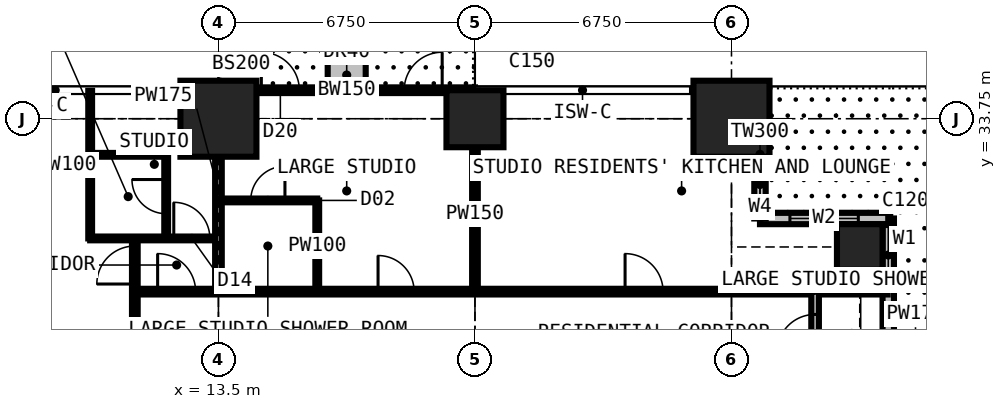
"""IFC4 building model, lengths in metres.
Left out: names, types, materials, properties, quantities, classifications, styles, units other than length and angle.
Written with IfcOpenShell. Run it as: python <this file> out.ifc"""

import sys

from ifc_helpers import new_model, si_unit, direction, frame, frame_2d, origin, origin_2d, place, context, subcontext, project, spatial, rectangle, extrude, element, fill, save


model = new_model("IFC4")
c1 = context("Model", 3, precision=1e-05, world=origin(), true_north=direction((0.0, 1.0)))
c2 = subcontext(c1, "Body", "Model", "MODEL_VIEW")
j1 = project(units=[si_unit("LENGTHUNIT", "METRE"), si_unit("PLANEANGLEUNIT", "RADIAN")], contexts=[c1])
p1 = place(None, origin())
s1 = spatial("IfcSite", under=j1, at=p1, CompositionType="ELEMENT")
p2 = place(p1, origin())
s2 = spatial("IfcBuilding", under=s1, at=p2, CompositionType="ELEMENT")
p3 = place(p2, frame((0.0, 0.0, 142.2)))
s3 = spatial("IfcBuildingStorey", under=s2, at=p3, CompositionType="ELEMENT", Elevation=142.2)
p4 = place(p3, frame((13.5, 33.75, 0.0), z_axis=(0.0, 0.0, 1.0), x_axis=(1.0, 0.0, 0.0)))
e1 = element("IfcColumn", 1, at=p4, inside=s3, PredefinedType="COLUMN", context=c2, shape_type="SweptSolid", body=[
    extrude(rectangle(XDim=2.0, YDim=2.0, at=origin_2d()), origin(), (0.0, 0.0, 1.0), 3.6),
])
p5 = place(p3, frame((20.25, 33.75, 0.0), z_axis=(0.0, 0.0, 1.0), x_axis=(1.0, 0.0, 0.0)))
e2 = element("IfcColumn", 2, at=p5, inside=s3, PredefinedType="COLUMN", context=c2, shape_type="SweptSolid", body=[
    extrude(rectangle(XDim=1.5, YDim=1.5, at=origin_2d()), origin(), (0.0, 0.0, 1.0), 3.6),
])
p6 = place(p3, frame((27.0, 33.75, 0.0), z_axis=(0.0, 0.0, 1.0), x_axis=(1.0, 0.0, 0.0)))
e3 = element("IfcColumn", 3, at=p6, inside=s3, PredefinedType="COLUMN", context=c2, shape_type="SweptSolid", body=[
    extrude(rectangle(XDim=2.0, YDim=2.0, at=origin_2d()), origin(), (0.0, 0.0, 1.0), 3.6),
])
p7 = place(p3, frame((30.375, 30.375, 0.0), z_axis=(0.0, 0.0, 1.0), x_axis=(1.0, 0.0, 0.0)))
e4 = element("IfcColumn", 4, at=p7, inside=s3, PredefinedType="COLUMN", context=c2, shape_type="SweptSolid", body=[
    extrude(rectangle(XDim=1.2, YDim=1.2, at=origin_2d()), origin(), (0.0, 0.0, 1.0), 3.6),
])
p8 = place(p3, frame((31.125, 27.75, 0.0), z_axis=(0.0, 0.0, 1.0), x_axis=(0.0, 1.0, 0.0)))
e5 = element("IfcWall", 5, at=p8, inside=s3, PredefinedType="SOLIDWALL", context=c2, shape_type="SweptSolid", body=[
    extrude(rectangle(XDim=3.375, YDim=0.3, at=frame_2d((1.688, 0.0))), origin(), (0.0, 0.0, 1.0), 3.375),
])
p9 = place(p8, frame((1.663, 0.0, 0.9)))
e6 = element("IfcOpeningElement", 6, at=p9, cuts=e5, PredefinedType="OPENING", context=c2, shape_type="SweptSolid", body=[
    extrude(rectangle(XDim=1.5, YDim=1.8, at=frame_2d((0.75, 0.9))), frame((0.0, 0.16, 0.0), z_axis=(0.0, -1.0, 0.0), x_axis=(1.0, 0.0, 0.0)), (0.0, 0.0, 1.0), 0.32),
])
p10 = place(p3, frame((31.125, 31.125, 0.0), z_axis=(0.0, 0.0, 1.0), x_axis=(-1.0, 0.0, 0.0)))
e7 = element("IfcWall", 7, at=p10, inside=s3, PredefinedType="SOLIDWALL", context=c2, shape_type="SweptSolid", body=[
    extrude(rectangle(XDim=3.375, YDim=0.3, at=frame_2d((1.688, 0.0))), origin(), (0.0, 0.0, 1.0), 3.375),
])
p11 = place(p10, frame((0.788, 0.0, 0.6)))
e8 = element("IfcOpeningElement", 8, at=p11, cuts=e7, PredefinedType="OPENING", context=c2, shape_type="SweptSolid", body=[
    extrude(rectangle(XDim=1.8, YDim=2.1, at=frame_2d((0.9, 1.05))), frame((0.0, 0.16, 0.0), z_axis=(0.0, -1.0, 0.0), x_axis=(1.0, 0.0, 0.0)), (0.0, 0.0, 1.0), 0.32),
])
p12 = place(p3, frame((27.75, 31.125, 0.0), z_axis=(0.0, 0.0, 1.0), x_axis=(0.0, 1.0, 0.0)))
e9 = element("IfcWall", 9, at=p12, inside=s3, PredefinedType="SOLIDWALL", context=c2, shape_type="SweptSolid", body=[
    extrude(rectangle(XDim=3.375, YDim=0.3, at=frame_2d((1.688, 0.0))), origin(), (0.0, 0.0, 1.0), 3.375),
])
p13 = place(p12, frame((0.292, 0.0, 0.9)))
e10 = element("IfcOpeningElement", 10, at=p13, cuts=e9, PredefinedType="OPENING", context=c2, shape_type="SweptSolid", body=[
    extrude(rectangle(XDim=1.2, YDim=1.8, at=frame_2d((0.6, 0.9))), frame((0.0, 0.16, 0.0), z_axis=(0.0, -1.0, 0.0), x_axis=(1.0, 0.0, 0.0)), (0.0, 0.0, 1.0), 0.32),
])
p14 = place(p3, frame((13.5, 34.5, 0.0), z_axis=(0.0, 0.0, 1.0), x_axis=(1.0, 0.0, 0.0)))
e11 = element("IfcWall", 11, at=p14, inside=s3, PredefinedType="SOLIDWALL", context=c2, shape_type="SweptSolid", body=[
    extrude(rectangle(XDim=6.75, YDim=0.15, at=frame_2d((3.375, 0.0))), origin(), (0.0, 0.0, 1.0), 3.375),
])
p15 = place(p14, frame((1.129, 0.0, 0.0)))
e12 = element("IfcOpeningElement", 12, at=p15, cuts=e11, PredefinedType="OPENING", context=c2, shape_type="SweptSolid", body=[
    extrude(rectangle(XDim=1.0, YDim=2.2, at=frame_2d((0.5, 1.1))), frame((0.0, 0.085, 0.0), z_axis=(0.0, -1.0, 0.0), x_axis=(1.0, 0.0, 0.0)), (0.0, 0.0, 1.0), 0.17),
])
p16 = place(p14, frame((2.258, 0.0, 0.9)))
e13 = element("IfcOpeningElement", 13, at=p16, cuts=e11, PredefinedType="OPENING", context=c2, shape_type="SweptSolid", body=[
    extrude(rectangle(XDim=0.9, YDim=1.8, at=frame_2d((0.45, 0.9))), frame((0.0, 0.085, 0.0), z_axis=(0.0, -1.0, 0.0), x_axis=(1.0, 0.0, 0.0)), (0.0, 0.0, 1.0), 0.17),
])
p17 = place(p14, frame((4.887, 0.0, 0.0)))
e14 = element("IfcOpeningElement", 14, at=p17, cuts=e11, PredefinedType="OPENING", context=c2, shape_type="SweptSolid", body=[
    extrude(rectangle(XDim=1.0, YDim=2.2, at=frame_2d((0.5, 1.1))), frame((0.0, 0.085, 0.0), z_axis=(0.0, -1.0, 0.0), x_axis=(1.0, 0.0, 0.0)), (0.0, 0.0, 1.0), 0.17),
])
p18 = place(p14, frame((3.575, 0.0, 0.9)))
e15 = element("IfcOpeningElement", 15, at=p18, cuts=e11, PredefinedType="OPENING", context=c2, shape_type="SweptSolid", body=[
    extrude(rectangle(XDim=1.2, YDim=1.8, at=frame_2d((0.6, 0.9))), frame((0.0, 0.085, 0.0), z_axis=(0.0, -1.0, 0.0), x_axis=(1.0, 0.0, 0.0)), (0.0, 0.0, 1.0), 0.17),
])
p19 = place(p3, frame((16.875, 34.6, 0.0), z_axis=(0.0, 0.0, 1.0), x_axis=(0.0, 1.0, 0.0)))
e16 = element("IfcWall", 16, at=p19, inside=s3, PredefinedType="USERDEFINED", context=c2, shape_type="SweptSolid", body=[
    extrude(rectangle(XDim=2.2, YDim=1.0, at=frame_2d((1.1, 0.0))), origin(), (0.0, 0.0, 1.0), 0.9),
])
p20 = place(p3, frame((10.125, 30.6, 0.0), z_axis=(0.0, 0.0, 1.0), x_axis=(0.0, 1.0, 0.0)))
e17 = element("IfcWall", 17, at=p20, inside=s3, PredefinedType="PARTITIONING", context=c2, shape_type="SweptSolid", body=[
    extrude(rectangle(XDim=3.884, YDim=0.1, at=frame_2d((1.942, 0.0))), origin(), (0.0, 0.0, 1.0), 3.375),
])
p21 = place(p3, frame((10.125, 30.6, 0.0), z_axis=(0.0, 0.0, 1.0), x_axis=(1.0, 0.0, 0.0)))
e18 = element("IfcWall", 18, at=p21, inside=s3, PredefinedType="PARTITIONING", context=c2, shape_type="SweptSolid", body=[
    extrude(rectangle(XDim=3.375, YDim=0.1, at=frame_2d((1.688, 0.0))), origin(), (0.0, 0.0, 1.0), 3.375),
])
p22 = place(p21, frame((2.2, 0.0, 0.0)))
e19 = element("IfcOpeningElement", 19, at=p22, cuts=e18, PredefinedType="OPENING", context=c2, shape_type="SweptSolid", body=[
    extrude(rectangle(XDim=0.95, YDim=2.2, at=frame_2d((0.475, 1.1))), frame((0.0, 0.06, 0.0), z_axis=(0.0, -1.0, 0.0), x_axis=(1.0, 0.0, 0.0)), (0.0, 0.0, 1.0), 0.12),
])
p23 = place(p3, frame((10.125, 32.8, 0.0), z_axis=(0.0, 0.0, 1.0), x_axis=(1.0, 0.0, 0.0)))
e20 = element("IfcWall", 20, at=p23, inside=s3, PredefinedType="PARTITIONING", context=c2, shape_type="SweptSolid", body=[
    extrude(rectangle(XDim=2.0, YDim=0.1, at=frame_2d((1.0, 0.0))), origin(), (0.0, 0.0, 1.0), 3.375),
])
p24 = place(p3, frame((11.3, 11.3, 0.0), z_axis=(0.0, 0.0, 1.0), x_axis=(0.0, 1.0, 0.0)))
e21 = element("IfcWall", 21, at=p24, inside=s3, PredefinedType="PARTITIONING", context=c2, shape_type="SweptSolid", body=[
    extrude(rectangle(XDim=19.3, YDim=0.15, at=frame_2d((9.65, 0.0))), origin(), (0.0, 0.0, 1.0), 3.375),
])
p25 = place(p24, frame((18.1, 0.0, 0.0)))
e22 = element("IfcOpeningElement", 22, at=p25, cuts=e21, PredefinedType="OPENING", context=c2, shape_type="SweptSolid", body=[
    extrude(rectangle(XDim=1.0, YDim=2.2, at=frame_2d((0.5, 1.1))), frame((0.0, 0.085, 0.0), z_axis=(0.0, -1.0, 0.0), x_axis=(1.0, 0.0, 0.0)), (0.0, 0.0, 1.0), 0.17),
])
p26 = place(p24, frame((12.137, 0.0, 0.0)))
e23 = element("IfcOpeningElement", 23, at=p26, cuts=e21, PredefinedType="OPENING", context=c2, shape_type="SweptSolid", body=[
    extrude(rectangle(XDim=1.0, YDim=2.2, at=frame_2d((0.5, 1.1))), frame((0.0, 0.085, 0.0), z_axis=(0.0, -1.0, 0.0), x_axis=(1.0, 0.0, 0.0)), (0.0, 0.0, 1.0), 0.17),
])
p27 = place(p3, frame((11.3, 29.2, 0.0), z_axis=(0.0, 0.0, 1.0), x_axis=(1.0, 0.0, 0.0)))
e24 = element("IfcWall", 24, at=p27, inside=s3, PredefinedType="PARTITIONING", context=c2, shape_type="SweptSolid", body=[
    extrude(rectangle(XDim=19.809, YDim=0.15, at=frame_2d((9.904, 0.0))), origin(), (0.0, 0.0, 1.0), 3.375),
])
p28 = place(p27, frame((12.9, 0.0, 0.0)))
e25 = element("IfcOpeningElement", 25, at=p28, cuts=e24, PredefinedType="OPENING", context=c2, shape_type="SweptSolid", body=[
    extrude(rectangle(XDim=1.0, YDim=2.2, at=frame_2d((0.5, 1.1))), frame((0.0, 0.085, 0.0), z_axis=(0.0, -1.0, 0.0), x_axis=(1.0, 0.0, 0.0)), (0.0, 0.0, 1.0), 0.17),
])
p29 = place(p27, frame((6.4, 0.0, 0.0)))
e26 = element("IfcOpeningElement", 26, at=p29, cuts=e24, PredefinedType="OPENING", context=c2, shape_type="SweptSolid", body=[
    extrude(rectangle(XDim=0.95, YDim=2.2, at=frame_2d((0.475, 1.1))), frame((0.0, 0.085, 0.0), z_axis=(0.0, -1.0, 0.0), x_axis=(1.0, 0.0, 0.0)), (0.0, 0.0, 1.0), 0.17),
])
p30 = place(p27, frame((0.6, 0.0, 0.0)))
e27 = element("IfcOpeningElement", 27, at=p30, cuts=e24, PredefinedType="OPENING", context=c2, shape_type="SweptSolid", body=[
    extrude(rectangle(XDim=1.0, YDim=2.2, at=frame_2d((0.5, 1.1))), frame((0.0, 0.085, 0.0), z_axis=(0.0, -1.0, 0.0), x_axis=(1.0, 0.0, 0.0)), (0.0, 0.0, 1.0), 0.17),
])
p31 = place(p3, frame((12.125, 30.6, 0.0), z_axis=(0.0, 0.0, 1.0), x_axis=(0.0, 1.0, 0.0)))
e28 = element("IfcWall", 28, at=p31, inside=s3, PredefinedType="PARTITIONING", context=c2, shape_type="SweptSolid", body=[
    extrude(rectangle(XDim=2.2, YDim=0.1, at=frame_2d((1.1, 0.0))), origin(), (0.0, 0.0, 1.0), 3.375),
])
p32 = place(p31, frame((0.65, 0.0, 0.0)))
e29 = element("IfcOpeningElement", 29, at=p32, cuts=e28, PredefinedType="OPENING", context=c2, shape_type="SweptSolid", body=[
    extrude(rectangle(XDim=0.9, YDim=2.2, at=frame_2d((0.45, 1.1))), frame((0.0, 0.06, 0.0), z_axis=(0.0, -1.0, 0.0), x_axis=(1.0, 0.0, 0.0)), (0.0, 0.0, 1.0), 0.12),
])
p33 = place(p3, frame((13.5, 29.2, 0.0), z_axis=(0.0, 0.0, 1.0), x_axis=(0.0, 1.0, 0.0)))
e30 = element("IfcWall", 30, at=p33, inside=s3, PredefinedType="PARTITIONING", context=c2, shape_type="SweptSolid", body=[
    extrude(rectangle(XDim=5.284, YDim=0.175, at=frame_2d((2.642, 0.0))), origin(), (0.0, 0.0, 1.0), 2.806),
])
p34 = place(p3, frame((13.5, 31.6, 0.0), z_axis=(0.0, 0.0, 1.0), x_axis=(1.0, 0.0, 0.0)))
e31 = element("IfcWall", 31, at=p34, inside=s3, PredefinedType="PARTITIONING", context=c2, shape_type="SweptSolid", body=[
    extrude(rectangle(XDim=2.6, YDim=0.1, at=frame_2d((1.3, 0.0))), origin(), (0.0, 0.0, 1.0), 3.375),
])
p35 = place(p34, frame((0.85, 0.0, 0.0)))
e32 = element("IfcOpeningElement", 32, at=p35, cuts=e31, PredefinedType="OPENING", context=c2, shape_type="SweptSolid", body=[
    extrude(rectangle(XDim=0.9, YDim=2.2, at=frame_2d((0.45, 1.1))), frame((0.0, 0.06, 0.0), z_axis=(0.0, -1.0, 0.0), x_axis=(1.0, 0.0, 0.0)), (0.0, 0.0, 1.0), 0.12),
])
p36 = place(p3, frame((16.1, 29.2, 0.0), z_axis=(0.0, 0.0, 1.0), x_axis=(0.0, 1.0, 0.0)))
e33 = element("IfcWall", 33, at=p36, inside=s3, PredefinedType="PARTITIONING", context=c2, shape_type="SweptSolid", body=[
    extrude(rectangle(XDim=2.4, YDim=0.1, at=frame_2d((1.2, 0.0))), origin(), (0.0, 0.0, 1.0), 3.375),
])
p37 = place(p3, frame((20.25, 29.2, 0.0), z_axis=(0.0, 0.0, 1.0), x_axis=(0.0, 1.0, 0.0)))
e34 = element("IfcWall", 34, at=p37, inside=s3, PredefinedType="PARTITIONING", context=c2, shape_type="SweptSolid", body=[
    extrude(rectangle(XDim=5.284, YDim=0.15, at=frame_2d((2.642, 0.0))), origin(), (0.0, 0.0, 1.0), 2.806),
])
p38 = place(p3, frame((29.2, 11.3, 0.0), z_axis=(0.0, 0.0, 1.0), x_axis=(0.0, 1.0, 0.0)))
e35 = element("IfcWall", 35, at=p38, inside=s3, PredefinedType="PARTITIONING", context=c2, shape_type="SweptSolid", body=[
    extrude(rectangle(XDim=17.9, YDim=0.2, at=frame_2d((8.95, 0.0))), origin(), (0.0, 0.0, 1.0), 3.375),
])
p39 = place(p38, frame((10.55, 0.0, 0.0)))
e36 = element("IfcOpeningElement", 36, at=p39, cuts=e35, PredefinedType="OPENING", context=c2, shape_type="SweptSolid", body=[
    extrude(rectangle(XDim=0.95, YDim=2.2, at=frame_2d((0.475, 1.1))), frame((0.0, 0.11, 0.0), z_axis=(0.0, -1.0, 0.0), x_axis=(1.0, 0.0, 0.0)), (0.0, 0.0, 1.0), 0.22),
])
p40 = place(p38, frame((16.3, 0.0, 0.0)))
e37 = element("IfcOpeningElement", 37, at=p40, cuts=e35, PredefinedType="OPENING", context=c2, shape_type="SweptSolid", body=[
    extrude(rectangle(XDim=1.0, YDim=2.2, at=frame_2d((0.5, 1.1))), frame((0.0, 0.11, 0.0), z_axis=(0.0, -1.0, 0.0), x_axis=(1.0, 0.0, 0.0)), (0.0, 0.0, 1.0), 0.22),
])
p41 = place(p38, frame((5.1, 0.0, 0.0)))
e38 = element("IfcOpeningElement", 38, at=p41, cuts=e35, PredefinedType="OPENING", context=c2, shape_type="SweptSolid", body=[
    extrude(rectangle(XDim=0.95, YDim=2.2, at=frame_2d((0.475, 1.1))), frame((0.0, 0.11, 0.0), z_axis=(0.0, -1.0, 0.0), x_axis=(1.0, 0.0, 0.0)), (0.0, 0.0, 1.0), 0.22),
])
p42 = place(p9, origin())
e39 = element("IfcWindow", 39, at=p42, inside=s3, PartitioningType="SINGLE_PANEL", PredefinedType="WINDOW", context=c2, shape_type="SweptSolid", body=[
    extrude(rectangle(XDim=1.5, YDim=1.8, at=frame_2d((0.75, 0.9))), frame((0.0, 0.03, 0.0), z_axis=(0.0, -1.0, 0.0), x_axis=(1.0, 0.0, 0.0)), (0.0, 0.0, 1.0), 0.06),
])
fill(e6, e39)
p43 = place(p11, origin())
e40 = element("IfcWindow", 40, at=p43, inside=s3, PartitioningType="SINGLE_PANEL", PredefinedType="WINDOW", context=c2, shape_type="SweptSolid", body=[
    extrude(rectangle(XDim=1.8, YDim=2.1, at=frame_2d((0.9, 1.05))), frame((0.0, 0.03, 0.0), z_axis=(0.0, -1.0, 0.0), x_axis=(1.0, 0.0, 0.0)), (0.0, 0.0, 1.0), 0.06),
])
fill(e8, e40)
p44 = place(p13, origin())
e41 = element("IfcWindow", 41, at=p44, inside=s3, PartitioningType="SINGLE_PANEL", PredefinedType="WINDOW", context=c2, shape_type="SweptSolid", body=[
    extrude(rectangle(XDim=1.2, YDim=1.8, at=frame_2d((0.6, 0.9))), frame((0.0, 0.03, 0.0), z_axis=(0.0, -1.0, 0.0), x_axis=(1.0, 0.0, 0.0)), (0.0, 0.0, 1.0), 0.06),
])
fill(e10, e41)
p45 = place(p15, origin())
e42 = element("IfcDoor", 42, at=p45, inside=s3, OperationType="SINGLE_SWING_LEFT", PredefinedType="DOOR", context=c2, shape_type="SweptSolid", body=[
    extrude(rectangle(XDim=1.0, YDim=2.2, at=frame_2d((0.5, 1.1))), frame((0.0, 0.025, 0.0), z_axis=(0.0, -1.0, 0.0), x_axis=(1.0, 0.0, 0.0)), (0.0, 0.0, 1.0), 0.05),
])
fill(e12, e42)
p46 = place(p16, origin())
e43 = element("IfcWindow", 43, at=p46, inside=s3, PartitioningType="SINGLE_PANEL", PredefinedType="WINDOW", context=c2, shape_type="SweptSolid", body=[
    extrude(rectangle(XDim=0.9, YDim=1.8, at=frame_2d((0.45, 0.9))), frame((0.0, 0.03, 0.0), z_axis=(0.0, -1.0, 0.0), x_axis=(1.0, 0.0, 0.0)), (0.0, 0.0, 1.0), 0.06),
])
fill(e13, e43)
p47 = place(p17, origin())
e44 = element("IfcDoor", 44, at=p47, inside=s3, OperationType="SINGLE_SWING_RIGHT", PredefinedType="DOOR", context=c2, shape_type="SweptSolid", body=[
    extrude(rectangle(XDim=1.0, YDim=2.2, at=frame_2d((0.5, 1.1))), frame((0.0, 0.025, 0.0), z_axis=(0.0, -1.0, 0.0), x_axis=(1.0, 0.0, 0.0)), (0.0, 0.0, 1.0), 0.05),
])
fill(e14, e44)
p48 = place(p18, origin())
e45 = element("IfcWindow", 45, at=p48, inside=s3, PartitioningType="SINGLE_PANEL", PredefinedType="WINDOW", context=c2, shape_type="SweptSolid", body=[
    extrude(rectangle(XDim=1.2, YDim=1.8, at=frame_2d((0.6, 0.9))), frame((0.0, 0.03, 0.0), z_axis=(0.0, -1.0, 0.0), x_axis=(1.0, 0.0, 0.0)), (0.0, 0.0, 1.0), 0.06),
])
fill(e15, e45)
p49 = place(p40, origin())
e46 = element("IfcDoor", 46, at=p49, inside=s3, OperationType="SINGLE_SWING_LEFT", PredefinedType="DOOR", context=c2, shape_type="SweptSolid", body=[
    extrude(rectangle(XDim=1.0, YDim=2.2, at=frame_2d((0.5, 1.1))), frame((0.0, 0.025, 0.0), z_axis=(0.0, -1.0, 0.0), x_axis=(1.0, 0.0, 0.0)), (0.0, 0.0, 1.0), 0.05),
])
fill(e37, e46)
p50 = place(p28, origin())
e47 = element("IfcDoor", 47, at=p50, inside=s3, OperationType="SINGLE_SWING_LEFT", PredefinedType="DOOR", context=c2, shape_type="SweptSolid", body=[
    extrude(rectangle(XDim=1.0, YDim=2.2, at=frame_2d((0.5, 1.1))), frame((0.0, 0.025, 0.0), z_axis=(0.0, -1.0, 0.0), x_axis=(1.0, 0.0, 0.0)), (0.0, 0.0, 1.0), 0.05),
])
fill(e25, e47)
p51 = place(p29, origin())
e48 = element("IfcDoor", 48, at=p51, inside=s3, OperationType="SINGLE_SWING_LEFT", PredefinedType="DOOR", context=c2, shape_type="SweptSolid", body=[
    extrude(rectangle(XDim=0.95, YDim=2.2, at=frame_2d((0.475, 1.1))), frame((0.0, 0.025, 0.0), z_axis=(0.0, -1.0, 0.0), x_axis=(1.0, 0.0, 0.0)), (0.0, 0.0, 1.0), 0.05),
])
fill(e26, e48)
p52 = place(p35, origin())
e49 = element("IfcDoor", 49, at=p52, inside=s3, OperationType="SINGLE_SWING_RIGHT", PredefinedType="DOOR", context=c2, shape_type="SweptSolid", body=[
    extrude(rectangle(XDim=0.9, YDim=2.2, at=frame_2d((0.45, 1.1))), frame((0.0, 0.025, 0.0), z_axis=(0.0, -1.0, 0.0), x_axis=(1.0, 0.0, 0.0)), (0.0, 0.0, 1.0), 0.05),
])
fill(e32, e49)
p53 = place(p22, origin())
e50 = element("IfcDoor", 50, at=p53, inside=s3, OperationType="SINGLE_SWING_LEFT", PredefinedType="DOOR", context=c2, shape_type="SweptSolid", body=[
    extrude(rectangle(XDim=0.95, YDim=2.2, at=frame_2d((0.475, 1.1))), frame((0.0, 0.025, 0.0), z_axis=(0.0, -1.0, 0.0), x_axis=(1.0, 0.0, 0.0)), (0.0, 0.0, 1.0), 0.05),
])
fill(e19, e50)
p54 = place(p32, origin())
e51 = element("IfcDoor", 51, at=p54, inside=s3, OperationType="SINGLE_SWING_RIGHT", PredefinedType="DOOR", context=c2, shape_type="SweptSolid", body=[
    extrude(rectangle(XDim=0.9, YDim=2.2, at=frame_2d((0.45, 1.1))), frame((0.0, 0.025, 0.0), z_axis=(0.0, -1.0, 0.0), x_axis=(1.0, 0.0, 0.0)), (0.0, 0.0, 1.0), 0.05),
])
fill(e29, e51)
p55 = place(p30, origin())
e52 = element("IfcDoor", 52, at=p55, inside=s3, OperationType="SINGLE_SWING_LEFT", PredefinedType="DOOR", context=c2, shape_type="SweptSolid", body=[
    extrude(rectangle(XDim=1.0, YDim=2.2, at=frame_2d((0.5, 1.1))), frame((0.0, 0.025, 0.0), z_axis=(0.0, -1.0, 0.0), x_axis=(1.0, 0.0, 0.0)), (0.0, 0.0, 1.0), 0.05),
])
fill(e27, e52)
p56 = place(p25, origin())
e53 = element("IfcDoor", 53, at=p56, inside=s3, OperationType="SINGLE_SWING_LEFT", PredefinedType="DOOR", context=c2, shape_type="SweptSolid", body=[
    extrude(rectangle(XDim=1.0, YDim=2.2, at=frame_2d((0.5, 1.1))), frame((0.0, 0.025, 0.0), z_axis=(0.0, -1.0, 0.0), x_axis=(1.0, 0.0, 0.0)), (0.0, 0.0, 1.0), 0.05),
])
fill(e22, e53)
save(model, sys.argv[1])
